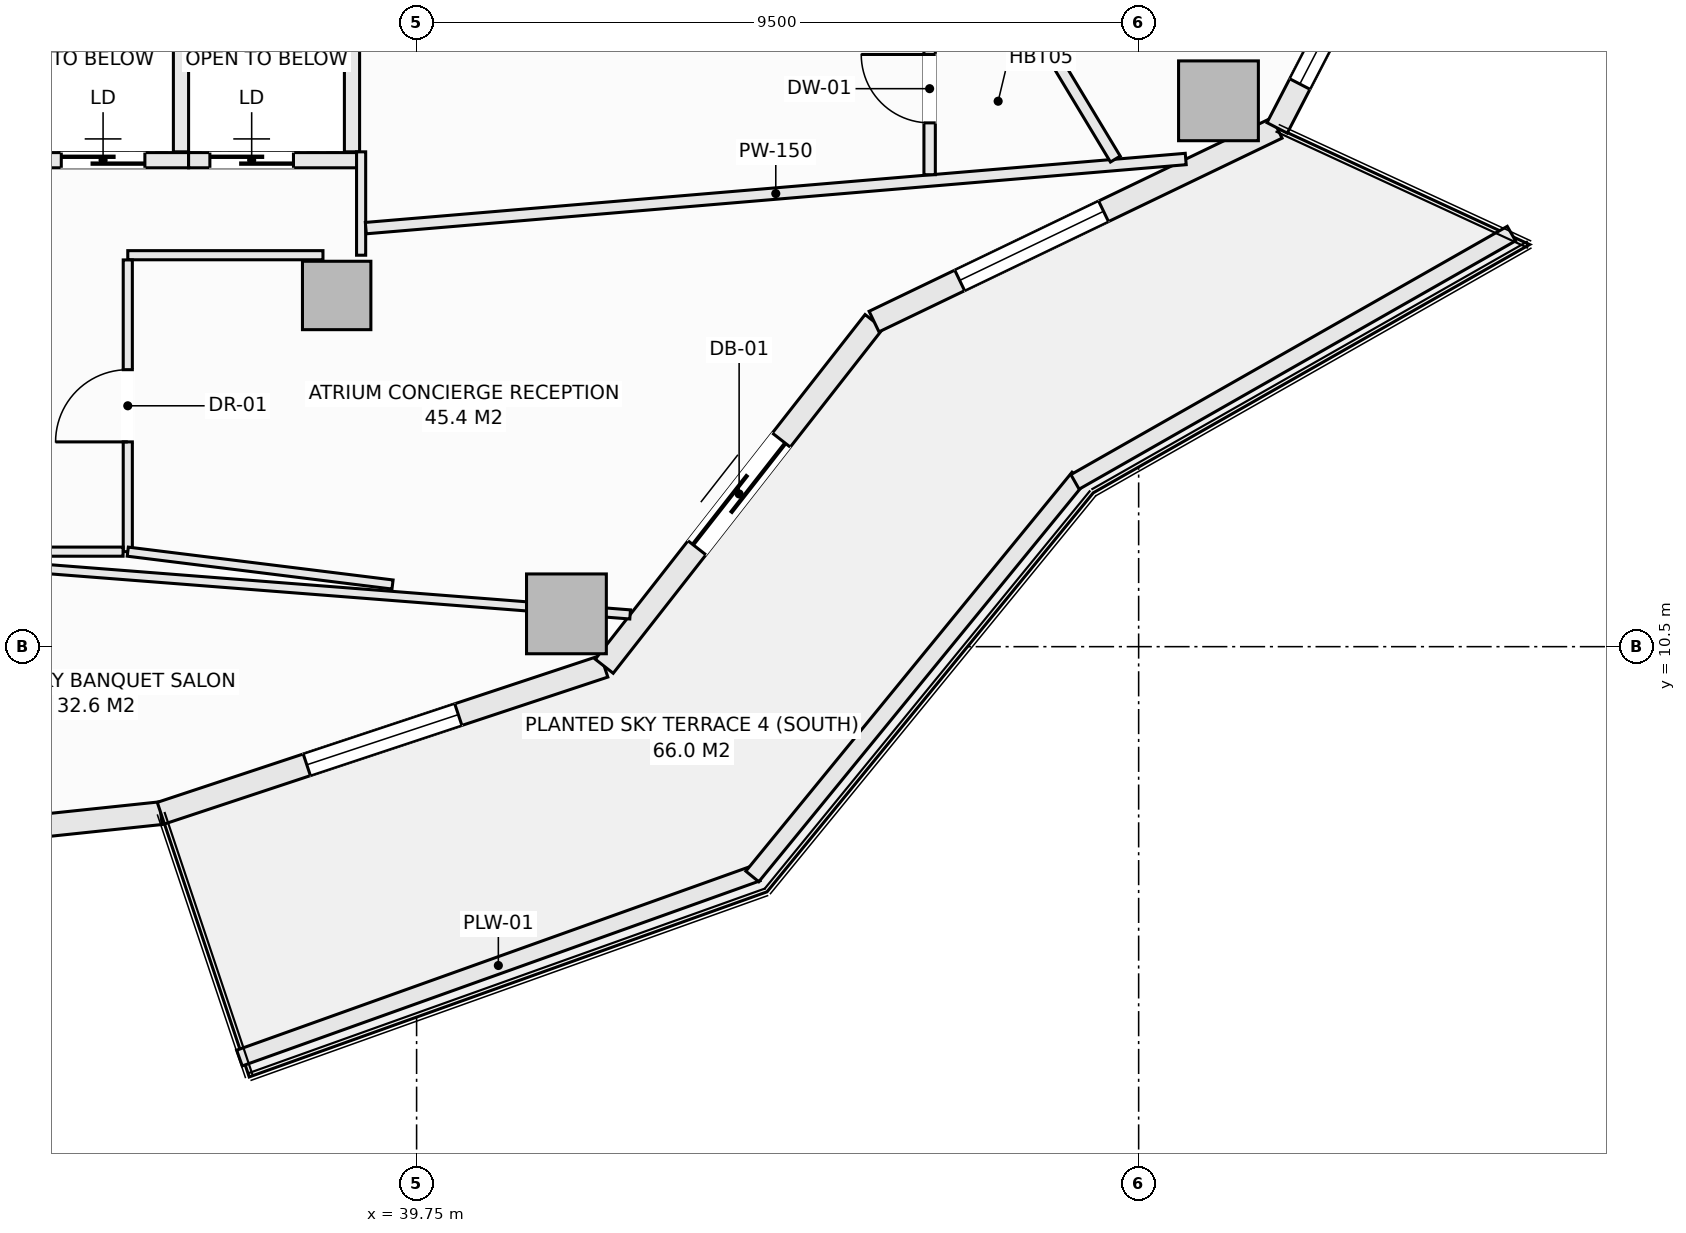
"""IFC4 building model, lengths in metres.
Left out: names, types, materials, properties, quantities, classifications, styles, units other than length and angle.
Written with IfcOpenShell. Run it as: python <this file> out.ifc"""

import sys

from ifc_helpers import new_model, si_unit, direction, frame, frame_2d, origin, origin_2d, place, context, subcontext, project, spatial, rectangle, extrude, element, fill, save


model = new_model("IFC4")
c1 = context("Model", 3, precision=1e-05, world=origin(), true_north=direction((0.0, 1.0)))
c2 = subcontext(c1, "Body", "Model", "MODEL_VIEW")
j1 = project(units=[si_unit("LENGTHUNIT", "METRE"), si_unit("PLANEANGLEUNIT", "RADIAN")], contexts=[c1])
p1 = place(None, origin())
s1 = spatial("IfcSite", under=j1, at=p1, CompositionType="ELEMENT")
p2 = place(p1, origin())
s2 = spatial("IfcBuilding", under=s1, at=p2, CompositionType="ELEMENT")
p3 = place(p2, frame((0.0, 0.0, 139.3)))
s3 = spatial("IfcBuildingStorey", under=s2, at=p3, CompositionType="ELEMENT", Elevation=139.3)
for number, where, z_axis, x_axis in (
    (1, (41.721, 10.932, -0.27), (0.0, 0.0, 1.0), (1.0, 0.0, 0.0)),
    (2, (50.3, 17.681, -0.27), (0.0, 0.0, 1.0), (1.0, 0.0, 0.0)),
):
    element("IfcColumn", number, at=place(p3, frame(where, z_axis=z_axis, x_axis=x_axis)), inside=s3, PredefinedType="COLUMN", context=c2, shape_type="SweptSolid", body=[
        extrude(rectangle(XDim=1.05, YDim=1.05, at=origin_2d()), origin(), (0.0, 0.0, 1.0), 3.4),
    ])
p4 = place(p3, frame((38.698, 15.121, -0.27), z_axis=(0.0, 0.0, 1.0), x_axis=(1.0, 0.0, 0.0)))
e3 = element("IfcColumn", 3, at=p4, inside=s3, PredefinedType="COLUMN", context=c2, shape_type="SweptSolid", body=[
    extrude(rectangle(XDim=0.9, YDim=0.9, at=origin_2d()), origin(), (0.0, 0.0, 1.0), 3.4),
])
p5 = place(p3, frame((30.125, 7.65, 0.0), z_axis=(0.0, 0.0, 1.0), x_axis=(0.994498012394, 0.104755445421, 0.0)))
e4 = element("IfcWall", 4, at=p5, inside=s3, PredefinedType="SOLIDWALL", context=c2, shape_type="SweptSolid", body=[
    extrude(rectangle(XDim=6.295, YDim=0.3, at=frame_2d((3.147, 0.0))), origin(), (0.0, 0.0, 1.0), 2.653),
])
p6 = place(p5, frame((2.097, 0.0, 0.74)))
e5 = element("IfcOpeningElement", 5, at=p6, cuts=e4, PredefinedType="OPENING", context=c2, shape_type="SweptSolid", body=[
    extrude(rectangle(XDim=2.1, YDim=1.7, at=frame_2d((1.05, 0.85))), frame((0.0, 0.16, 0.0), z_axis=(0.0, -1.0, 0.0), x_axis=(1.0, 0.0, 0.0)), (0.0, 0.0, 1.0), 0.32),
])
p7 = place(p3, frame((36.385, 8.309, 0.0), z_axis=(0.0, 0.0, 1.0), x_axis=(0.949238009374, 0.314558741032, 0.0)))
e6 = element("IfcWall", 6, at=p7, inside=s3, PredefinedType="SOLIDWALL", context=c2, shape_type="SweptSolid", body=[
    extrude(rectangle(XDim=6.146, YDim=0.3, at=frame_2d((3.073, 0.0))), origin(), (0.0, 0.0, 1.0), 2.653),
])
p8 = place(p7, frame((2.023, 0.0, 0.74)))
e7 = element("IfcOpeningElement", 7, at=p8, cuts=e6, PredefinedType="OPENING", context=c2, shape_type="SweptSolid", body=[
    extrude(rectangle(XDim=2.1, YDim=1.7, at=frame_2d((1.05, 0.85))), frame((0.0, 0.16, 0.0), z_axis=(0.0, -1.0, 0.0), x_axis=(1.0, 0.0, 0.0)), (0.0, 0.0, 1.0), 0.32),
])
p9 = place(p3, frame((42.219, 10.242, 0.0), z_axis=(0.0, 0.0, 1.0), x_axis=(0.616435134162, 0.787405693001, 0.0)))
e8 = element("IfcWall", 8, at=p9, inside=s3, PredefinedType="SOLIDWALL", context=c2, shape_type="SweptSolid", body=[
    extrude(rectangle(XDim=5.759, YDim=0.3, at=frame_2d((2.879, 0.0))), origin(), (0.0, 0.0, 1.0), 2.653),
])
p10 = place(p9, frame((1.979, 0.0, 0.0)))
e9 = element("IfcOpeningElement", 9, at=p10, cuts=e8, PredefinedType="OPENING", context=c2, shape_type="SweptSolid", body=[
    extrude(rectangle(XDim=1.8, YDim=2.25, at=frame_2d((0.9, 1.125))), frame((0.0, 0.16, 0.0), z_axis=(0.0, -1.0, 0.0), x_axis=(1.0, 0.0, 0.0)), (0.0, 0.0, 1.0), 0.32),
])
p11 = place(p3, frame((45.769, 14.777, 0.0), z_axis=(0.0, 0.0, 1.0), x_axis=(0.901370184739, 0.433049408339, 0.0)))
e10 = element("IfcWall", 10, at=p11, inside=s3, PredefinedType="SOLIDWALL", context=c2, shape_type="SweptSolid", body=[
    extrude(rectangle(XDim=5.884, YDim=0.3, at=frame_2d((2.942, 0.0))), origin(), (0.0, 0.0, 1.0), 2.653),
])
p12 = place(p11, frame((1.25, 0.0, 0.74)))
e11 = element("IfcOpeningElement", 11, at=p12, cuts=e10, PredefinedType="OPENING", context=c2, shape_type="SweptSolid", body=[
    extrude(rectangle(XDim=2.1, YDim=1.7, at=frame_2d((1.05, 0.85))), frame((0.0, 0.16, 0.0), z_axis=(0.0, -1.0, 0.0), x_axis=(1.0, 0.0, 0.0)), (0.0, 0.0, 1.0), 0.32),
])
p13 = place(p3, frame((51.072, 17.325, 0.0), z_axis=(0.0, 0.0, 1.0), x_axis=(0.459767899643, 0.888039119892, 0.0)))
e12 = element("IfcWall", 12, at=p13, inside=s3, PredefinedType="SOLIDWALL", context=c2, shape_type="SweptSolid", body=[
    extrude(rectangle(XDim=5.255, YDim=0.3, at=frame_2d((2.628, 0.0))), origin(), (0.0, 0.0, 1.0), 2.653),
])
p14 = place(p13, frame((0.65, 0.0, 0.74)))
e13 = element("IfcOpeningElement", 13, at=p14, cuts=e12, PredefinedType="OPENING", context=c2, shape_type="SweptSolid", body=[
    extrude(rectangle(XDim=2.1, YDim=1.7, at=frame_2d((1.05, 0.85))), frame((0.0, 0.16, 0.0), z_axis=(0.0, -1.0, 0.0), x_axis=(1.0, 0.0, 0.0)), (0.0, 0.0, 1.0), 0.32),
])
p15 = place(p3, frame((37.419, 5.087, 0.0), z_axis=(0.0, 0.0, 1.0), x_axis=(0.941632697311, 0.336642040387, 0.0)))
e14 = element("IfcWall", 14, at=p15, inside=s3, PredefinedType="PARAPET", context=c2, shape_type="SweptSolid", body=[
    extrude(rectangle(XDim=7.236, YDim=0.22, at=frame_2d((3.618, 0.0))), origin(), (0.0, 0.0, 1.0), 0.52),
])
p16 = place(p3, frame((44.167, 7.477, 0.0), z_axis=(0.0, 0.0, 1.0), x_axis=(0.633002467947, 0.77414977593, 0.0)))
e15 = element("IfcWall", 15, at=p16, inside=s3, PredefinedType="PARAPET", context=c2, shape_type="SweptSolid", body=[
    extrude(rectangle(XDim=6.78, YDim=0.22, at=frame_2d((3.39, 0.0))), origin(), (0.0, 0.0, 1.0), 0.52),
])
p17 = place(p3, frame((48.413, 12.668, 0.0), z_axis=(0.0, 0.0, 1.0), x_axis=(0.869187658335, 0.494482370361, 0.0)))
e16 = element("IfcWall", 16, at=p17, inside=s3, PredefinedType="PARAPET", context=c2, shape_type="SweptSolid", body=[
    extrude(rectangle(XDim=6.606, YDim=0.22, at=frame_2d((3.303, 0.0))), origin(), (0.0, 0.0, 1.0), 0.52),
])
p18 = place(p3, frame((34.5, 16.9, 0.0), z_axis=(0.0, 0.0, 1.0), x_axis=(1.0, 0.0, 0.0)))
e17 = element("IfcWall", 17, at=p18, inside=s3, PredefinedType="SOLIDWALL", context=c2, shape_type="SweptSolid", body=[
    extrude(rectangle(XDim=2.25, YDim=0.2, at=frame_2d((1.125, 0.0))), origin(), (0.0, 0.0, 1.0), 3.13),
])
p19 = place(p18, frame((0.575, 0.0, 0.0)))
e18 = element("IfcOpeningElement", 18, at=p19, cuts=e17, PredefinedType="OPENING", context=c2, shape_type="SweptSolid", body=[
    extrude(rectangle(XDim=1.1, YDim=2.2, at=frame_2d((0.55, 1.1))), frame((0.0, 0.11, 0.0), z_axis=(0.0, -1.0, 0.0), x_axis=(1.0, 0.0, 0.0)), (0.0, 0.0, 1.0), 0.22),
])
p20 = place(p3, frame((36.65, 17.01, 0.0), z_axis=(0.0, 0.0, 1.0), x_axis=(0.0, 1.0, 0.0)))
e19 = element("IfcWall", 19, at=p20, inside=s3, PredefinedType="SOLIDWALL", context=c2, shape_type="SweptSolid", body=[
    extrude(rectangle(XDim=2.43, YDim=0.2, at=frame_2d((1.215, 0.0))), origin(), (0.0, 0.0, 1.0), 3.13),
])
p21 = place(p3, frame((36.75, 16.9, 0.0), z_axis=(0.0, 0.0, 1.0), x_axis=(1.0, 0.0, 0.0)))
e20 = element("IfcWall", 20, at=p21, inside=s3, PredefinedType="SOLIDWALL", context=c2, shape_type="SweptSolid", body=[
    extrude(rectangle(XDim=2.25, YDim=0.2, at=frame_2d((1.125, 0.0))), origin(), (0.0, 0.0, 1.0), 3.13),
])
p22 = place(p21, frame((0.28, 0.0, 0.0)))
e21 = element("IfcOpeningElement", 21, at=p22, cuts=e20, PredefinedType="OPENING", context=c2, shape_type="SweptSolid", body=[
    extrude(rectangle(XDim=1.1, YDim=2.2, at=frame_2d((0.55, 1.1))), frame((0.0, 0.11, 0.0), z_axis=(0.0, -1.0, 0.0), x_axis=(1.0, 0.0, 0.0)), (0.0, 0.0, 1.0), 0.22),
])
p23 = place(p3, frame((38.9, 17.01, 0.0), z_axis=(0.0, 0.0, 1.0), x_axis=(0.0, 1.0, 0.0)))
e22 = element("IfcWall", 22, at=p23, inside=s3, PredefinedType="SOLIDWALL", context=c2, shape_type="SweptSolid", body=[
    extrude(rectangle(XDim=2.43, YDim=0.2, at=frame_2d((1.215, 0.0))), origin(), (0.0, 0.0, 1.0), 3.13),
])
p24 = place(p3, frame((39.02, 15.65, 0.0), z_axis=(0.0, 0.0, 1.0), x_axis=(0.0, 1.0, 0.0)))
e23 = element("IfcWall", 23, at=p24, inside=s3, PredefinedType="PARTITIONING", context=c2, shape_type="SweptSolid", body=[
    extrude(rectangle(XDim=1.36, YDim=0.12, at=frame_2d((0.68, 0.0))), origin(), (0.0, 0.0, 1.0), 2.505),
])
p25 = place(p3, frame((35.95, 15.65, 0.0), z_axis=(0.0, 0.0, 1.0), x_axis=(1.0, 0.0, 0.0)))
e24 = element("IfcWall", 24, at=p25, inside=s3, PredefinedType="PARTITIONING", context=c2, shape_type="SweptSolid", body=[
    extrude(rectangle(XDim=2.568, YDim=0.12, at=frame_2d((1.284, 0.0))), origin(), (0.0, 0.0, 1.0), 3.13),
])
p26 = place(p3, frame((35.95, 11.75, 0.0), z_axis=(0.0, 0.0, 1.0), x_axis=(0.0, 1.0, 0.0)))
e25 = element("IfcWall", 25, at=p26, inside=s3, PredefinedType="PARTITIONING", context=c2, shape_type="SweptSolid", body=[
    extrude(rectangle(XDim=3.838, YDim=0.12, at=frame_2d((1.919, 0.0))), origin(), (0.0, 0.0, 1.0), 3.13),
])
p27 = place(p26, frame((1.444, 0.0, 0.0)))
e26 = element("IfcOpeningElement", 26, at=p27, cuts=e25, PredefinedType="OPENING", context=c2, shape_type="SweptSolid", body=[
    extrude(rectangle(XDim=0.95, YDim=2.1, at=frame_2d((0.475, 1.05))), frame((0.0, 0.07, 0.0), z_axis=(0.0, -1.0, 0.0), x_axis=(1.0, 0.0, 0.0)), (0.0, 0.0, 1.0), 0.14),
])
p28 = place(p3, frame((27.212, 11.75, 0.0), z_axis=(0.0, 0.0, 1.0), x_axis=(1.0, 0.0, 0.0)))
e27 = element("IfcWall", 27, at=p28, inside=s3, PredefinedType="PARTITIONING", context=c2, shape_type="SweptSolid", body=[
    extrude(rectangle(XDim=8.676, YDim=0.12, at=frame_2d((4.338, 0.0))), origin(), (0.0, 0.0, 1.0), 3.13),
])
p29 = place(p28, frame((1.105, 0.0, 0.0)))
e28 = element("IfcOpeningElement", 28, at=p29, cuts=e27, PredefinedType="OPENING", context=c2, shape_type="SweptSolid", body=[
    extrude(rectangle(XDim=0.95, YDim=2.1, at=frame_2d((0.475, 1.05))), frame((0.0, 0.07, 0.0), z_axis=(0.0, -1.0, 0.0), x_axis=(1.0, 0.0, 0.0)), (0.0, 0.0, 1.0), 0.14),
])
p30 = place(p28, frame((4.698, 0.0, 0.0)))
e29 = element("IfcOpeningElement", 29, at=p30, cuts=e27, PredefinedType="OPENING", context=c2, shape_type="SweptSolid", body=[
    extrude(rectangle(XDim=0.95, YDim=2.1, at=frame_2d((0.475, 1.05))), frame((0.0, 0.07, 0.0), z_axis=(0.0, -1.0, 0.0), x_axis=(1.0, 0.0, 0.0)), (0.0, 0.0, 1.0), 0.14),
])
p31 = place(p3, frame((39.082, 16.007, 0.0), z_axis=(0.0, 0.0, 1.0), x_axis=(0.996467083395, 0.083984234889, 0.0)))
e30 = element("IfcWall", 30, at=p31, inside=s3, PredefinedType="PARTITIONING", context=c2, shape_type="SweptSolid", body=[
    extrude(rectangle(XDim=10.826, YDim=0.15, at=frame_2d((5.413, 0.0))), origin(), (0.0, 0.0, 1.0), 2.653),
])
p32 = place(p3, frame((33.872, 11.6, 0.0), z_axis=(0.0, 0.0, 1.0), x_axis=(0.996986194661, -0.077579170241, 0.0)))
e31 = element("IfcWall", 31, at=p32, inside=s3, PredefinedType="PARTITIONING", context=c2, shape_type="SweptSolid", body=[
    extrude(rectangle(XDim=8.714, YDim=0.12, at=frame_2d((4.357, 0.0))), origin(), (0.0, 0.0, 1.0), 2.653),
])
p33 = place(p3, frame((35.95, 11.75, 0.0), z_axis=(0.0, 0.0, 1.0), x_axis=(0.992393012253, -0.123110150805, 0.0)))
e32 = element("IfcWall", 32, at=p33, inside=s3, PredefinedType="PARTITIONING", context=c2, shape_type="SweptSolid", body=[
    extrude(rectangle(XDim=3.51, YDim=0.12, at=frame_2d((1.755, 0.0))), origin(), (0.0, 0.0, 1.0), 3.13),
])
p34 = place(p3, frame((38.862, 33.647, 0.0), z_axis=(0.0, 0.0, 1.0), x_axis=(0.516075497247, -0.856543099407, 0.0)))
e33 = element("IfcWall", 33, at=p34, inside=s3, PredefinedType="PARTITIONING", context=c2, shape_type="SweptSolid", body=[
    extrude(rectangle(XDim=19.534, YDim=0.15, at=frame_2d((9.767, 0.0))), origin(), (0.0, 0.0, 1.0), 1.922),
])
p35 = place(p3, frame((46.5, 16.709, 0.0), z_axis=(0.0, 0.0, 1.0), x_axis=(0.0, 1.0, 0.0)))
e34 = element("IfcWall", 34, at=p35, inside=s3, PredefinedType="PARTITIONING", context=c2, shape_type="SweptSolid", body=[
    extrude(rectangle(XDim=2.264, YDim=0.15, at=frame_2d((1.132, 0.0))), origin(), (0.0, 0.0, 1.0), 3.13),
])
p36 = place(p35, frame((0.682, 0.0, 0.0)))
e35 = element("IfcOpeningElement", 35, at=p36, cuts=e34, PredefinedType="OPENING", context=c2, shape_type="SweptSolid", body=[
    extrude(rectangle(XDim=0.9, YDim=2.1, at=frame_2d((0.45, 1.05))), frame((0.0, 0.085, 0.0), z_axis=(0.0, -1.0, 0.0), x_axis=(1.0, 0.0, 0.0)), (0.0, 0.0, 1.0), 0.17),
])
p37 = place(p8, origin())
e36 = element("IfcWindow", 36, at=p37, inside=s3, PartitioningType="SINGLE_PANEL", PredefinedType="WINDOW", context=c2, shape_type="SweptSolid", body=[
    extrude(rectangle(XDim=2.1, YDim=1.7, at=frame_2d((1.05, 0.85))), frame((0.0, 0.03, 0.0), z_axis=(0.0, -1.0, 0.0), x_axis=(1.0, 0.0, 0.0)), (0.0, 0.0, 1.0), 0.06),
])
fill(e7, e36)
p38 = place(p10, frame((1.8, 0.0, 0.0), z_axis=(0.0, 0.0, 1.0), x_axis=(-1.0, 0.0, 0.0)))
e37 = element("IfcDoor", 37, at=p38, inside=s3, OperationType="SLIDING_TO_LEFT", PredefinedType="DOOR", context=c2, shape_type="SweptSolid", body=[
    extrude(rectangle(XDim=1.8, YDim=2.25, at=frame_2d((0.9, 1.125))), frame((0.0, 0.025, 0.0), z_axis=(0.0, -1.0, 0.0), x_axis=(1.0, 0.0, 0.0)), (0.0, 0.0, 1.0), 0.05),
])
fill(e9, e37)
p39 = place(p12, origin())
e38 = element("IfcWindow", 38, at=p39, inside=s3, PartitioningType="SINGLE_PANEL", PredefinedType="WINDOW", context=c2, shape_type="SweptSolid", body=[
    extrude(rectangle(XDim=2.1, YDim=1.7, at=frame_2d((1.05, 0.85))), frame((0.0, 0.03, 0.0), z_axis=(0.0, -1.0, 0.0), x_axis=(1.0, 0.0, 0.0)), (0.0, 0.0, 1.0), 0.06),
])
fill(e11, e38)
p40 = place(p14, origin())
e39 = element("IfcWindow", 39, at=p40, inside=s3, PartitioningType="SINGLE_PANEL", PredefinedType="WINDOW", context=c2, shape_type="SweptSolid", body=[
    extrude(rectangle(XDim=2.1, YDim=1.7, at=frame_2d((1.05, 0.85))), frame((0.0, 0.03, 0.0), z_axis=(0.0, -1.0, 0.0), x_axis=(1.0, 0.0, 0.0)), (0.0, 0.0, 1.0), 0.06),
])
fill(e13, e39)
p41 = place(p19, origin())
e40 = element("IfcDoor", 40, at=p41, inside=s3, OperationType="SLIDING_TO_LEFT", PredefinedType="DOOR", context=c2, shape_type="SweptSolid", body=[
    extrude(rectangle(XDim=1.1, YDim=2.2, at=frame_2d((0.55, 1.1))), frame((0.0, 0.025, 0.0), z_axis=(0.0, -1.0, 0.0), x_axis=(1.0, 0.0, 0.0)), (0.0, 0.0, 1.0), 0.05),
])
fill(e18, e40)
p42 = place(p22, origin())
e41 = element("IfcDoor", 41, at=p42, inside=s3, OperationType="SLIDING_TO_LEFT", PredefinedType="DOOR", context=c2, shape_type="SweptSolid", body=[
    extrude(rectangle(XDim=1.1, YDim=2.2, at=frame_2d((0.55, 1.1))), frame((0.0, 0.025, 0.0), z_axis=(0.0, -1.0, 0.0), x_axis=(1.0, 0.0, 0.0)), (0.0, 0.0, 1.0), 0.05),
])
fill(e21, e41)
p43 = place(p27, origin())
e42 = element("IfcDoor", 42, at=p43, inside=s3, OperationType="SINGLE_SWING_LEFT", PredefinedType="DOOR", context=c2, shape_type="SweptSolid", body=[
    extrude(rectangle(XDim=0.95, YDim=2.1, at=frame_2d((0.475, 1.05))), frame((0.0, 0.025, 0.0), z_axis=(0.0, -1.0, 0.0), x_axis=(1.0, 0.0, 0.0)), (0.0, 0.0, 1.0), 0.05),
])
fill(e26, e42)
p44 = place(p36, origin())
e43 = element("IfcDoor", 43, at=p44, inside=s3, OperationType="SINGLE_SWING_RIGHT", PredefinedType="DOOR", context=c2, shape_type="SweptSolid", body=[
    extrude(rectangle(XDim=0.9, YDim=2.1, at=frame_2d((0.45, 1.05))), frame((0.0, 0.025, 0.0), z_axis=(0.0, -1.0, 0.0), x_axis=(1.0, 0.0, 0.0)), (0.0, 0.0, 1.0), 0.05),
])
fill(e35, e43)
save(model, sys.argv[1])
